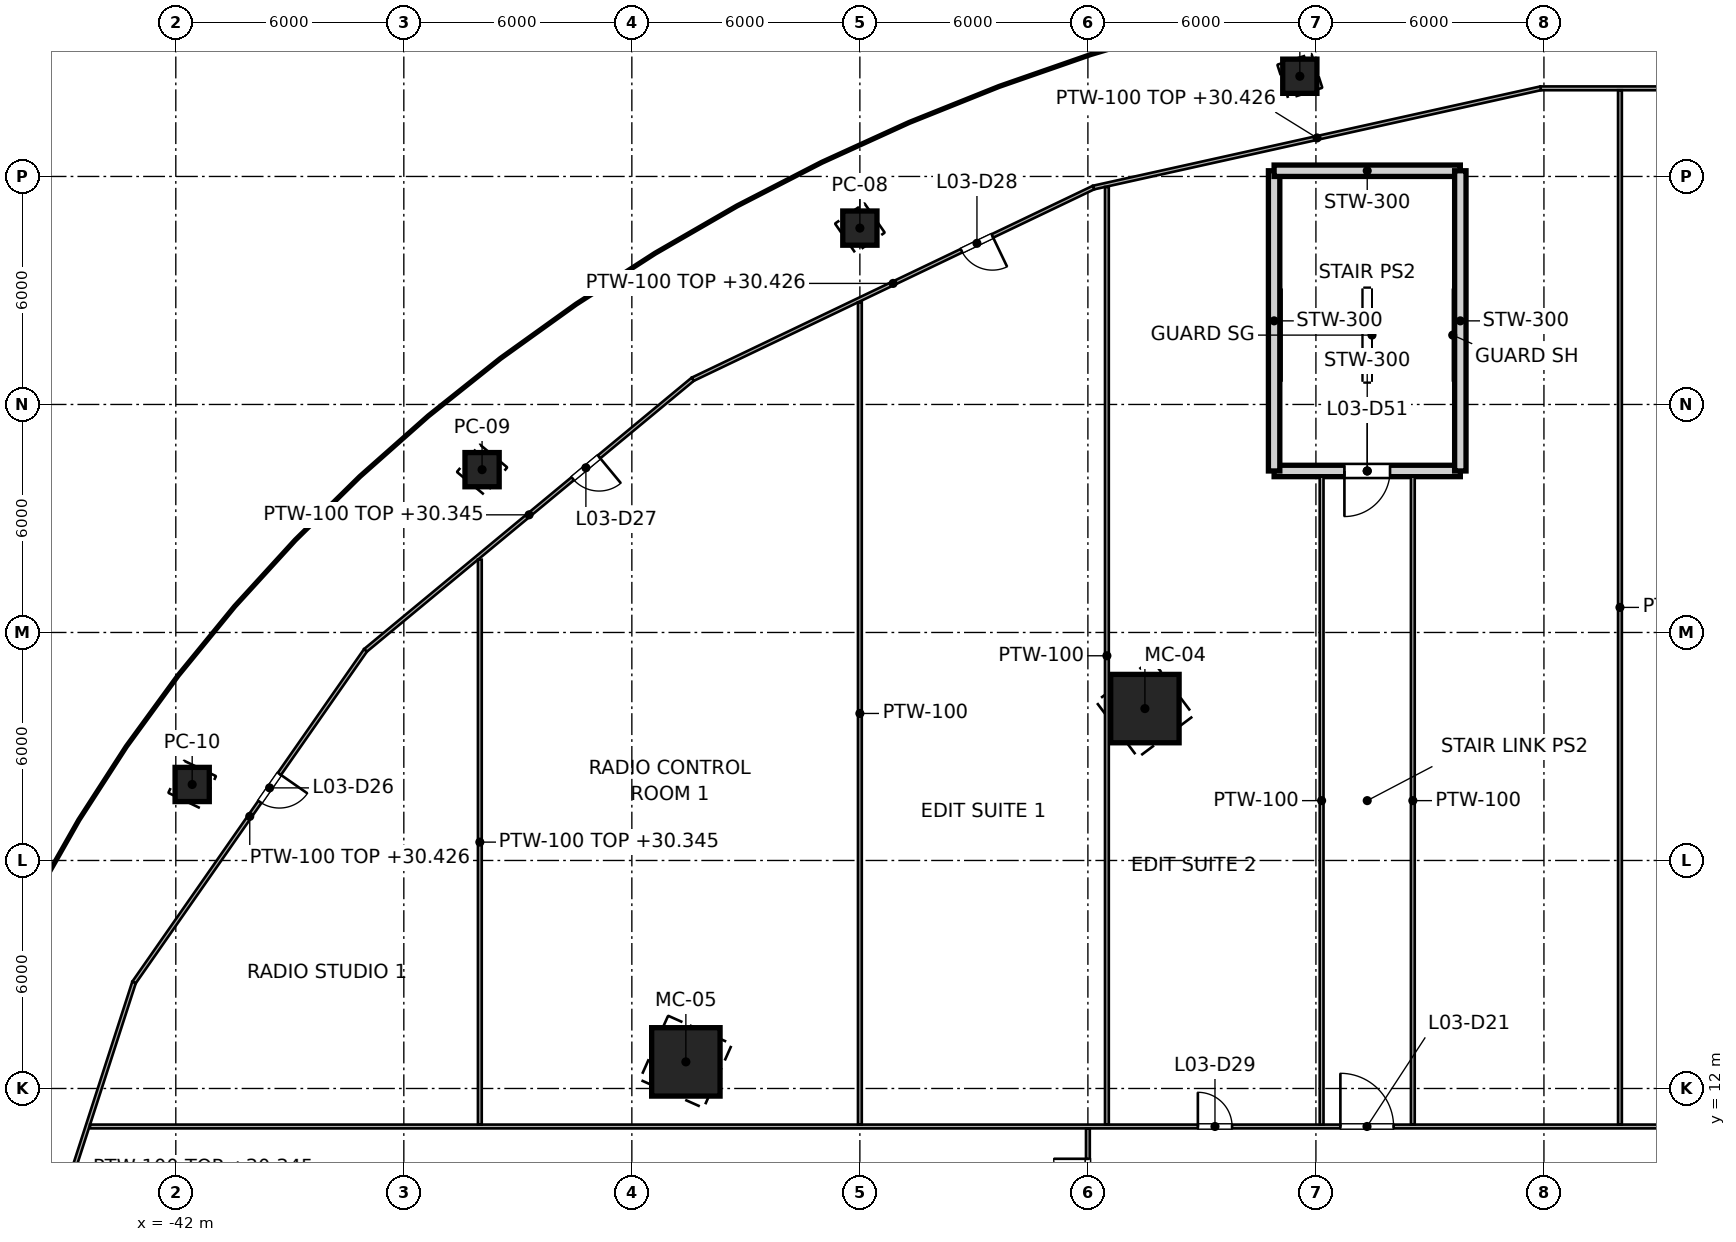
"""IFC4 building model, lengths in metres.
Left out: names, types, materials, properties, quantities, classifications, styles, units other than length and angle.
Written with IfcOpenShell. Run it as: python <this file> out.ifc"""

import sys

from ifc_helpers import new_model, si_unit, direction, frame, frame_2d, origin, origin_2d, place, context, subcontext, project, spatial, rectangle, hollow_rectangle, extrude, element, fill, save


model = new_model("IFC4")
c1 = context("Model", 3, precision=1e-05, world=origin(), true_north=direction((0.0, 1.0)))
c2 = subcontext(c1, "Body", "Model", "MODEL_VIEW")
j1 = project(units=[si_unit("LENGTHUNIT", "METRE"), si_unit("PLANEANGLEUNIT", "RADIAN")], contexts=[c1])
p1 = place(None, origin())
s1 = spatial("IfcSite", under=j1, at=p1, CompositionType="ELEMENT")
p2 = place(p1, origin())
s2 = spatial("IfcBuilding", under=s1, at=p2, CompositionType="ELEMENT")
p3 = place(p2, frame((0.0, 0.0, 26.0)))
s3 = spatial("IfcBuildingStorey", under=s2, at=p3, CompositionType="ELEMENT", Elevation=26.0)
for number, where, z_axis, x_axis in (
    (1, (-16.5, 21.997, 0.0), (0.0, 0.0, 1.0), (-0.6, 0.8, 0.0)),
    (2, (-28.579, 12.7, 0.0), (0.0, 0.0, 1.0), (-0.914, 0.406, 0.0)),
):
    element("IfcColumn", number, at=place(p3, frame(where, z_axis=z_axis, x_axis=x_axis)), inside=s3, PredefinedType="COLUMN", context=c2, shape_type="SweptSolid", body=[
        extrude(hollow_rectangle(XDim=1.8, YDim=1.8, WallThickness=0.08, at=origin_2d()), origin(), (0.0, 0.0, 1.0), 5.4),
    ])
for number, where, z_axis, x_axis in (
    (3, (-12.423, 38.637, 0.0), (0.0, 0.0, 1.0), (-0.306, 0.952, 0.0)),
    (4, (-24.0, 34.641, 0.0), (0.0, 0.0, 1.0), (-0.569, 0.822, 0.0)),
    (5, (-33.941, 28.284, 0.0), (0.0, 0.0, 1.0), (-0.768, 0.64, 0.0)),
    (6, (-41.569, 20.0, 0.0), (0.0, 0.0, 1.0), (-0.901, 0.434, 0.0)),
):
    element("IfcColumn", number, at=place(p3, frame(where, z_axis=z_axis, x_axis=x_axis)), inside=s3, PredefinedType="COLUMN", context=c2, shape_type="SweptSolid", body=[
        extrude(hollow_rectangle(XDim=0.9, YDim=0.9, WallThickness=0.04, at=origin_2d()), origin(), (0.0, 0.0, 1.0), 5.4),
    ])
p4 = place(p3, frame((-8.2, 28.25, 0.0), z_axis=(0.0, 0.0, 1.0), x_axis=(-1.0, 0.0, 0.0)))
e7 = element("IfcWall", 7, at=p4, inside=s3, PredefinedType="SOLIDWALL", context=c2, shape_type="SweptSolid", body=[
    extrude(rectangle(XDim=4.9, YDim=0.3, at=frame_2d((2.45, 0.0))), origin(), (0.0, 0.0, 1.0), 5.2),
])
p5 = place(p4, frame((1.85, 0.0, 0.0)))
e8 = element("IfcOpeningElement", 8, at=p5, cuts=e7, PredefinedType="OPENING", context=c2, shape_type="SweptSolid", body=[
    extrude(rectangle(XDim=1.2, YDim=2.1, at=frame_2d((0.6, 1.05))), frame((0.0, 0.15, 0.0), z_axis=(0.0, -1.0, 0.0), x_axis=(1.0, 0.0, 0.0)), (0.0, 0.0, 1.0), 0.3),
])
p6 = place(p3, frame((-13.1, 28.25, 0.0), z_axis=(0.0, 0.0, 1.0), x_axis=(0.0, 1.0, 0.0)))
e9 = element("IfcWall", 9, at=p6, inside=s3, PredefinedType="SOLIDWALL", context=c2, shape_type="SweptSolid", body=[
    extrude(rectangle(XDim=7.9, YDim=0.3, at=frame_2d((3.95, 0.0))), origin(), (0.0, 0.0, 1.0), 5.2),
])
p7 = place(p3, frame((-13.1, 36.15, 0.0), z_axis=(0.0, 0.0, 1.0), x_axis=(1.0, 0.0, 0.0)))
e10 = element("IfcWall", 10, at=p7, inside=s3, PredefinedType="SOLIDWALL", context=c2, shape_type="SweptSolid", body=[
    extrude(rectangle(XDim=4.9, YDim=0.3, at=frame_2d((2.45, 0.0))), origin(), (0.0, 0.0, 1.0), 5.2),
])
p8 = place(p3, frame((-8.2, 36.15, 0.0), z_axis=(0.0, 0.0, 1.0), x_axis=(0.0, -1.0, 0.0)))
e11 = element("IfcWall", 11, at=p8, inside=s3, PredefinedType="SOLIDWALL", context=c2, shape_type="SweptSolid", body=[
    extrude(rectangle(XDim=7.9, YDim=0.3, at=frame_2d((3.95, 0.0))), origin(), (0.0, 0.0, 1.0), 5.2),
])
p9 = place(p3, frame((6.089, 38.319, 0.0), z_axis=(0.0, 0.0, 1.0), x_axis=(-1.0, 0.0, 0.0)))
e12 = element("IfcWall", 12, at=p9, inside=s3, PredefinedType="PARTITIONING", context=c2, shape_type="SweptSolid", body=[
    extrude(rectangle(XDim=12.178, YDim=0.1, at=frame_2d((6.089, 0.0))), origin(), (0.0, 0.0, 1.0), 4.426),
])
p10 = place(p3, frame((-6.089, 38.319, 0.0), z_axis=(0.0, 0.0, 1.0), x_axis=(-0.97623471049, -0.216715920124, 0.0)))
e13 = element("IfcWall", 13, at=p10, inside=s3, PredefinedType="PARTITIONING", context=c2, shape_type="SweptSolid", body=[
    extrude(rectangle(XDim=12.05, YDim=0.1, at=frame_2d((6.025, 0.0))), origin(), (0.0, 0.0, 1.0), 4.426),
])
p11 = place(p3, frame((-17.852, 35.708, 0.0), z_axis=(0.0, 0.0, 1.0), x_axis=(-0.902100999032, -0.431524955878, 0.0)))
e14 = element("IfcWall", 14, at=p11, inside=s3, PredefinedType="PARTITIONING", context=c2, shape_type="SweptSolid", body=[
    extrude(rectangle(XDim=11.691, YDim=0.1, at=frame_2d((5.845, 0.0))), origin(), (0.0, 0.0, 1.0), 4.426),
])
p12 = place(p11, frame((2.95, 0.0, 0.0)))
e15 = element("IfcOpeningElement", 15, at=p12, cuts=e14, PredefinedType="OPENING", context=c2, shape_type="SweptSolid", body=[
    extrude(rectangle(XDim=0.9, YDim=2.1, at=frame_2d((0.45, 1.05))), frame((0.0, 0.05, 0.0), z_axis=(0.0, -1.0, 0.0), x_axis=(1.0, 0.0, 0.0)), (0.0, 0.0, 1.0), 0.1),
])
p13 = place(p3, frame((-28.399, 30.663, 0.0), z_axis=(0.0, 0.0, 1.0), x_axis=(-0.770046995363, -0.637987166746, 0.0)))
e16 = element("IfcWall", 16, at=p13, inside=s3, PredefinedType="PARTITIONING", context=c2, shape_type="SweptSolid", body=[
    extrude(rectangle(XDim=11.183, YDim=0.1, at=frame_2d((5.591, 0.0))), origin(), (0.0, 0.0, 1.0), 4.345),
])
p14 = place(p13, frame((3.2, 0.0, 0.0)))
e17 = element("IfcOpeningElement", 17, at=p14, cuts=e16, PredefinedType="OPENING", context=c2, shape_type="SweptSolid", body=[
    extrude(rectangle(XDim=0.9, YDim=2.1, at=frame_2d((0.45, 1.05))), frame((0.0, 0.05, 0.0), z_axis=(0.0, -1.0, 0.0), x_axis=(1.0, 0.0, 0.0)), (0.0, 0.0, 1.0), 0.1),
])
p15 = place(p3, frame((-37.01, 23.529, 0.0), z_axis=(0.0, 0.0, 1.0), x_axis=(-0.571737958261, -0.820436290692, 0.0)))
e18 = element("IfcWall", 18, at=p15, inside=s3, PredefinedType="PARTITIONING", context=c2, shape_type="SweptSolid", body=[
    extrude(rectangle(XDim=10.65, YDim=0.1, at=frame_2d((5.325, 0.0))), origin(), (0.0, 0.0, 1.0), 4.426),
])
p16 = place(p15, frame((3.96, 0.0, 0.0)))
e19 = element("IfcOpeningElement", 19, at=p16, cuts=e18, PredefinedType="OPENING", context=c2, shape_type="SweptSolid", body=[
    extrude(rectangle(XDim=0.9, YDim=2.1, at=frame_2d((0.45, 1.05))), frame((0.0, 0.05, 0.0), z_axis=(0.0, -1.0, 0.0), x_axis=(1.0, 0.0, 0.0)), (0.0, 0.0, 1.0), 0.1),
])
p17 = place(p3, frame((-43.099, 14.791, 0.0), z_axis=(0.0, 0.0, 1.0), x_axis=(-0.307713034182, -0.951479210805, 0.0)))
e20 = element("IfcWall", 20, at=p17, inside=s3, PredefinedType="PARTITIONING", context=c2, shape_type="SweptSolid", body=[
    extrude(rectangle(XDim=10.243, YDim=0.1, at=frame_2d((5.122, 0.0))), origin(), (0.0, 0.0, 1.0), 4.345),
])
p18 = place(p3, frame((-44.256, 11.0, 0.0), z_axis=(0.0, 0.0, 1.0), x_axis=(1.0, 0.0, 0.0)))
e21 = element("IfcWall", 21, at=p18, inside=s3, PredefinedType="PARTITIONING", context=c2, shape_type="SweptSolid", body=[
    extrude(rectangle(XDim=88.512, YDim=0.1, at=frame_2d((44.256, 0.0))), origin(), (0.0, 0.0, 1.0), 4.268),
])
p19 = place(p18, frame((54.2, 0.0, 0.0)))
e22 = element("IfcOpeningElement", 22, at=p19, cuts=e21, PredefinedType="OPENING", context=c2, shape_type="SweptSolid", body=[
    extrude(rectangle(XDim=1.4, YDim=2.1, at=frame_2d((0.7, 1.05))), frame((0.0, 0.05, 0.0), z_axis=(0.0, -1.0, 0.0), x_axis=(1.0, 0.0, 0.0)), (0.0, 0.0, 1.0), 0.1),
])
p20 = place(p18, frame((32.9, 0.0, 0.0)))
e23 = element("IfcOpeningElement", 23, at=p20, cuts=e21, PredefinedType="OPENING", context=c2, shape_type="SweptSolid", body=[
    extrude(rectangle(XDim=1.4, YDim=2.1, at=frame_2d((0.7, 1.05))), frame((0.0, 0.05, 0.0), z_axis=(0.0, -1.0, 0.0), x_axis=(1.0, 0.0, 0.0)), (0.0, 0.0, 1.0), 0.1),
])
p21 = place(p18, frame((29.15, 0.0, 0.0)))
e24 = element("IfcOpeningElement", 24, at=p21, cuts=e21, PredefinedType="OPENING", context=c2, shape_type="SweptSolid", body=[
    extrude(rectangle(XDim=0.9, YDim=2.1, at=frame_2d((0.45, 1.05))), frame((0.0, 0.05, 0.0), z_axis=(0.0, -1.0, 0.0), x_axis=(1.0, 0.0, 0.0)), (0.0, 0.0, 1.0), 0.1),
])
p22 = place(p18, frame((46.55, 0.0, 0.0)))
e25 = element("IfcOpeningElement", 25, at=p22, cuts=e21, PredefinedType="OPENING", context=c2, shape_type="SweptSolid", body=[
    extrude(rectangle(XDim=0.9, YDim=2.1, at=frame_2d((0.45, 1.05))), frame((0.0, 0.05, 0.0), z_axis=(0.0, -1.0, 0.0), x_axis=(1.0, 0.0, 0.0)), (0.0, 0.0, 1.0), 0.1),
])
p23 = place(p18, frame((60.85, 0.0, 0.0)))
e26 = element("IfcOpeningElement", 26, at=p23, cuts=e21, PredefinedType="OPENING", context=c2, shape_type="SweptSolid", body=[
    extrude(rectangle(XDim=0.9, YDim=2.1, at=frame_2d((0.45, 1.05))), frame((0.0, 0.05, 0.0), z_axis=(0.0, -1.0, 0.0), x_axis=(1.0, 0.0, 0.0)), (0.0, 0.0, 1.0), 0.1),
])
p24 = place(p3, frame((-18.0, -10.95, 0.0), z_axis=(0.0, 0.0, 1.0), x_axis=(0.0, 1.0, 0.0)))
e27 = element("IfcWall", 27, at=p24, inside=s3, PredefinedType="PARTITIONING", context=c2, shape_type="SweptSolid", body=[
    extrude(rectangle(XDim=21.9, YDim=0.1, at=frame_2d((10.95, 0.0))), origin(), (0.0, 0.0, 1.0), 4.277),
])
p25 = place(p24, frame((19.3, 0.0, 0.0)))
e28 = element("IfcOpeningElement", 28, at=p25, cuts=e27, PredefinedType="OPENING", context=c2, shape_type="SweptSolid", body=[
    extrude(rectangle(XDim=1.8, YDim=2.1, at=frame_2d((0.9, 1.05))), frame((0.0, 0.05, 0.0), z_axis=(0.0, -1.0, 0.0), x_axis=(1.0, 0.0, 0.0)), (0.0, 0.0, 1.0), 0.1),
])
p26 = place(p24, frame((5.85, 0.0, 0.0)))
e29 = element("IfcOpeningElement", 29, at=p26, cuts=e27, PredefinedType="OPENING", context=c2, shape_type="SweptSolid", body=[
    extrude(rectangle(XDim=0.9, YDim=2.1, at=frame_2d((0.45, 1.05))), frame((0.0, 0.05, 0.0), z_axis=(0.0, -1.0, 0.0), x_axis=(1.0, 0.0, 0.0)), (0.0, 0.0, 1.0), 0.1),
])
p27 = place(p24, frame((10.45, 0.0, 0.0)))
e30 = element("IfcOpeningElement", 30, at=p27, cuts=e27, PredefinedType="OPENING", context=c2, shape_type="SweptSolid", body=[
    extrude(rectangle(XDim=0.9, YDim=2.1, at=frame_2d((0.45, 1.05))), frame((0.0, 0.05, 0.0), z_axis=(0.0, -1.0, 0.0), x_axis=(1.0, 0.0, 0.0)), (0.0, 0.0, 1.0), 0.1),
])
p28 = place(p24, frame((15.05, 0.0, 0.0)))
e31 = element("IfcOpeningElement", 31, at=p28, cuts=e27, PredefinedType="OPENING", context=c2, shape_type="SweptSolid", body=[
    extrude(rectangle(XDim=0.9, YDim=2.1, at=frame_2d((0.45, 1.05))), frame((0.0, 0.05, 0.0), z_axis=(0.0, -1.0, 0.0), x_axis=(1.0, 0.0, 0.0)), (0.0, 0.0, 1.0), 0.1),
])
p29 = place(p3, frame((-34.0, 11.05, 0.0), z_axis=(0.0, 0.0, 1.0), x_axis=(0.0, 1.0, 0.0)))
e32 = element("IfcWall", 32, at=p29, inside=s3, PredefinedType="PARTITIONING", context=c2, shape_type="SweptSolid", body=[
    extrude(rectangle(XDim=14.866, YDim=0.1, at=frame_2d((7.433, 0.0))), origin(), (0.0, 0.0, 1.0), 4.345),
])
p30 = place(p3, frame((-24.0, 11.05, 0.0), z_axis=(0.0, 0.0, 1.0), x_axis=(0.0, 1.0, 0.0)))
e33 = element("IfcWall", 33, at=p30, inside=s3, PredefinedType="PARTITIONING", context=c2, shape_type="SweptSolid", body=[
    extrude(rectangle(XDim=21.638, YDim=0.1, at=frame_2d((10.819, 0.0))), origin(), (0.0, 0.0, 1.0), 4.268),
])
p31 = place(p3, frame((-17.5, 11.05, 0.0), z_axis=(0.0, 0.0, 1.0), x_axis=(0.0, 1.0, 0.0)))
e34 = element("IfcWall", 34, at=p31, inside=s3, PredefinedType="PARTITIONING", context=c2, shape_type="SweptSolid", body=[
    extrude(rectangle(XDim=24.674, YDim=0.1, at=frame_2d((12.337, 0.0))), origin(), (0.0, 0.0, 1.0), 4.268),
])
p32 = place(p3, frame((-4.0, 11.05, 0.0), z_axis=(0.0, 0.0, 1.0), x_axis=(0.0, 1.0, 0.0)))
e35 = element("IfcWall", 35, at=p32, inside=s3, PredefinedType="PARTITIONING", context=c2, shape_type="SweptSolid", body=[
    extrude(rectangle(XDim=27.219, YDim=0.1, at=frame_2d((13.61, 0.0))), origin(), (0.0, 0.0, 1.0), 4.268),
])
for number, where, z_axis, x_axis in (
    (36, (-11.85, 11.05, 0.0), (0.0, 0.0, 1.0), (0.0, 1.0, 0.0)),
    (37, (-9.45, 11.05, 0.0), (0.0, 0.0, 1.0), (0.0, 1.0, 0.0)),
):
    element("IfcWall", number, at=place(p3, frame(where, z_axis=z_axis, x_axis=x_axis)), inside=s3, PredefinedType="PARTITIONING", context=c2, shape_type="SweptSolid", body=[
        extrude(rectangle(XDim=17.05, YDim=0.1, at=frame_2d((8.525, 0.0))), origin(), (0.0, 0.0, 1.0), 4.268),
    ])
p33 = place(p20, origin())
e38 = element("IfcDoor", 38, at=p33, inside=s3, OperationType="SINGLE_SWING_LEFT", PredefinedType="DOOR", context=c2, shape_type="SweptSolid", body=[
    extrude(rectangle(XDim=1.4, YDim=2.1, at=frame_2d((0.7, 1.05))), frame((0.0, 0.025, 0.0), z_axis=(0.0, -1.0, 0.0), x_axis=(1.0, 0.0, 0.0)), (0.0, 0.0, 1.0), 0.05),
])
fill(e23, e38)
p34 = place(p16, origin())
e39 = element("IfcDoor", 39, at=p34, inside=s3, OperationType="SINGLE_SWING_LEFT", PredefinedType="DOOR", context=c2, shape_type="SweptSolid", body=[
    extrude(rectangle(XDim=0.9, YDim=2.1, at=frame_2d((0.45, 1.05))), frame((0.0, 0.025, 0.0), z_axis=(0.0, -1.0, 0.0), x_axis=(1.0, 0.0, 0.0)), (0.0, 0.0, 1.0), 0.05),
])
fill(e19, e39)
p35 = place(p14, origin())
e40 = element("IfcDoor", 40, at=p35, inside=s3, OperationType="SINGLE_SWING_LEFT", PredefinedType="DOOR", context=c2, shape_type="SweptSolid", body=[
    extrude(rectangle(XDim=0.9, YDim=2.1, at=frame_2d((0.45, 1.05))), frame((0.0, 0.025, 0.0), z_axis=(0.0, -1.0, 0.0), x_axis=(1.0, 0.0, 0.0)), (0.0, 0.0, 1.0), 0.05),
])
fill(e17, e40)
p36 = place(p12, origin())
e41 = element("IfcDoor", 41, at=p36, inside=s3, OperationType="SINGLE_SWING_LEFT", PredefinedType="DOOR", context=c2, shape_type="SweptSolid", body=[
    extrude(rectangle(XDim=0.9, YDim=2.1, at=frame_2d((0.45, 1.05))), frame((0.0, 0.025, 0.0), z_axis=(0.0, -1.0, 0.0), x_axis=(1.0, 0.0, 0.0)), (0.0, 0.0, 1.0), 0.05),
])
fill(e15, e41)
p37 = place(p21, origin())
e42 = element("IfcDoor", 42, at=p37, inside=s3, OperationType="SINGLE_SWING_LEFT", PredefinedType="DOOR", context=c2, shape_type="SweptSolid", body=[
    extrude(rectangle(XDim=0.9, YDim=2.1, at=frame_2d((0.45, 1.05))), frame((0.0, 0.025, 0.0), z_axis=(0.0, -1.0, 0.0), x_axis=(1.0, 0.0, 0.0)), (0.0, 0.0, 1.0), 0.05),
])
fill(e24, e42)
p38 = place(p25, origin())
e43 = element("IfcDoor", 43, at=p38, inside=s3, OperationType="DOUBLE_DOOR_SINGLE_SWING", PredefinedType="DOOR", context=c2, shape_type="SweptSolid", body=[
    extrude(rectangle(XDim=1.8, YDim=2.1, at=frame_2d((0.9, 1.05))), frame((0.0, 0.025, 0.0), z_axis=(0.0, -1.0, 0.0), x_axis=(1.0, 0.0, 0.0)), (0.0, 0.0, 1.0), 0.05),
])
fill(e28, e43)
p39 = place(p5, origin())
e44 = element("IfcDoor", 44, at=p39, inside=s3, OperationType="SINGLE_SWING_RIGHT", PredefinedType="DOOR", context=c2, shape_type="SweptSolid", body=[
    extrude(rectangle(XDim=1.2, YDim=2.1, at=frame_2d((0.6, 1.05))), frame((0.0, 0.025, 0.0), z_axis=(0.0, -1.0, 0.0), x_axis=(1.0, 0.0, 0.0)), (0.0, 0.0, 1.0), 0.05),
])
fill(e8, e44)
save(model, sys.argv[1])
